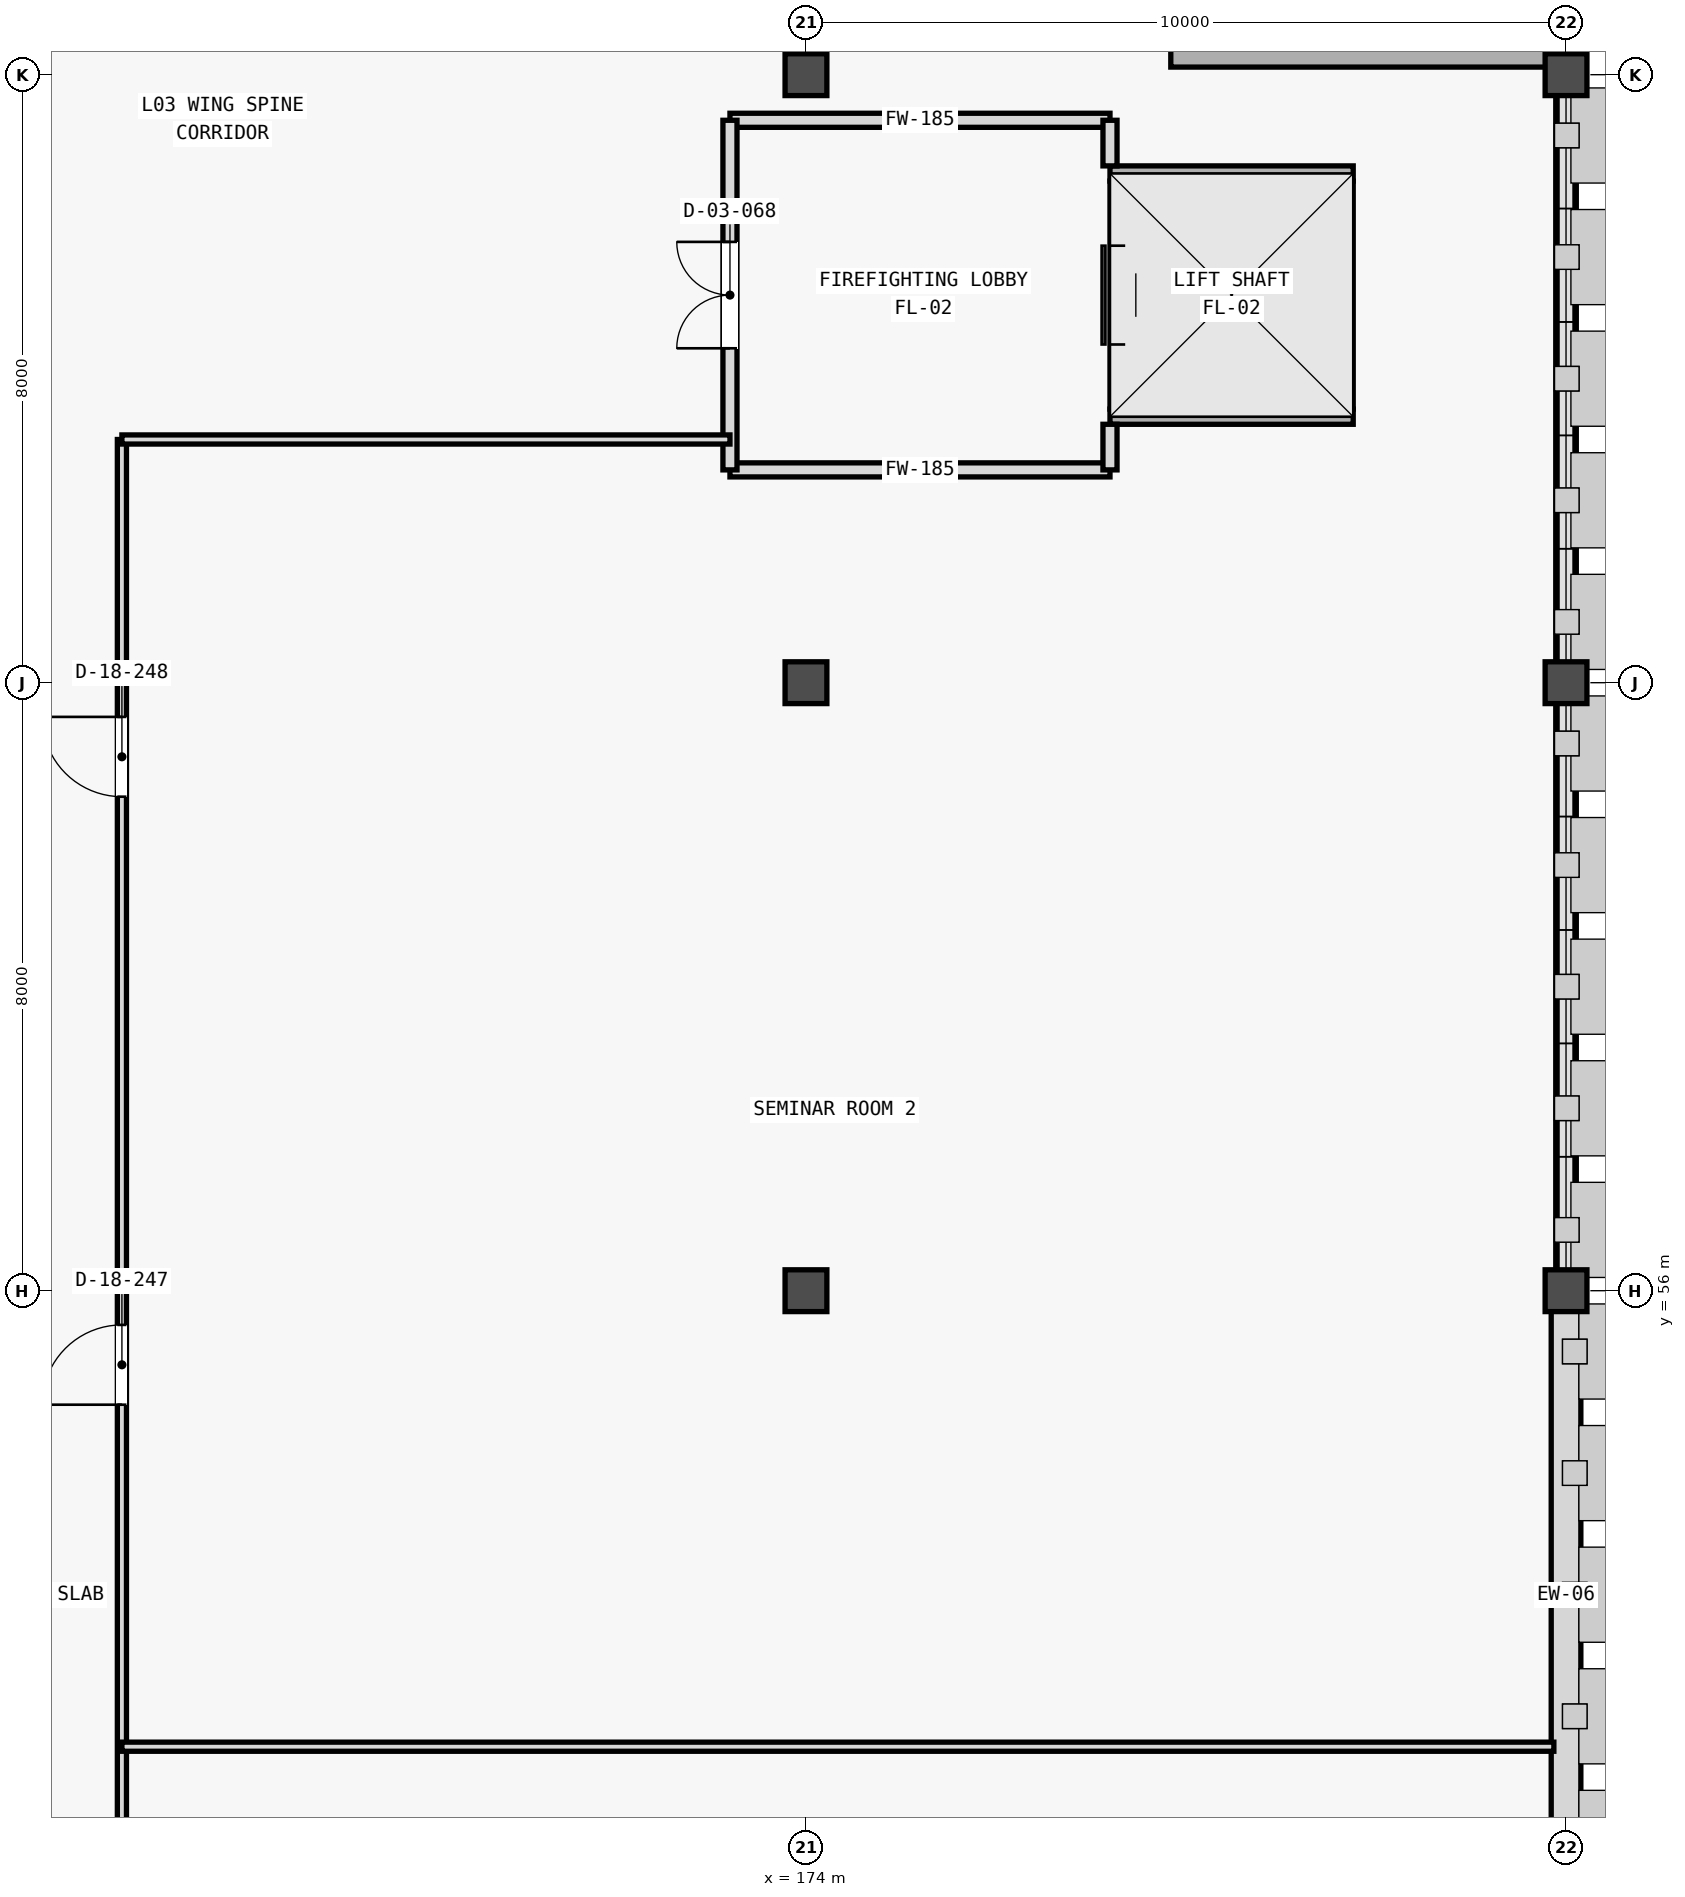
"""IFC4 building model, lengths in metres.
Left out: names, types, materials, properties, quantities, classifications, styles, units other than length and angle.
Written with IfcOpenShell. Run it as: python <this file> out.ifc"""

import sys

from ifc_helpers import new_model, si_unit, direction, frame, frame_2d, origin, origin_2d, place, context, subcontext, project, spatial, rectangle, extrude, element, fill, save


model = new_model("IFC4")
c1 = context("Model", 3, precision=1e-05, world=origin(), true_north=direction((0.0, 1.0)))
c2 = subcontext(c1, "Body", "Model", "MODEL_VIEW")
j1 = project(units=[si_unit("LENGTHUNIT", "METRE"), si_unit("PLANEANGLEUNIT", "RADIAN")], contexts=[c1])
p1 = place(None, origin())
s1 = spatial("IfcSite", under=j1, at=p1, CompositionType="ELEMENT")
p2 = place(p1, origin())
s2 = spatial("IfcBuilding", under=s1, at=p2, CompositionType="ELEMENT")
p3 = place(p2, frame((0.0, 0.0, 14.4)))
s3 = spatial("IfcBuildingStorey", under=s2, at=p3, CompositionType="ELEMENT", Elevation=14.4)
for number, where, z_axis, x_axis in (
    (1, (174.0, 56.0, 0.0), (0.0, 0.0, 1.0), (1.0, 0.0, 0.0)),
    (2, (184.0, 56.0, 0.0), (0.0, 0.0, 1.0), (1.0, 0.0, 0.0)),
    (3, (174.0, 64.0, 0.0), (0.0, 0.0, 1.0), (1.0, 0.0, 0.0)),
    (4, (184.0, 64.0, 0.0), (0.0, 0.0, 1.0), (1.0, 0.0, 0.0)),
    (5, (174.0, 72.0, 0.0), (0.0, 0.0, 1.0), (1.0, 0.0, 0.0)),
    (6, (184.0, 72.0, 0.0), (0.0, 0.0, 1.0), (1.0, 0.0, 0.0)),
):
    element("IfcColumn", number, at=place(p3, frame(where, z_axis=z_axis, x_axis=x_axis)), inside=s3, PredefinedType="COLUMN", context=c2, shape_type="SweptSolid", body=[
        extrude(rectangle(XDim=0.55, YDim=0.55, at=origin_2d()), origin(), (0.0, 0.0, 1.0), 3.975),
    ])
p4 = place(p3, frame((184.0, 48.271, 0.0), z_axis=(0.0, 0.0, 1.0), x_axis=(0.0, 1.0, 0.0)))
e7 = element("IfcWall", 7, at=p4, inside=s3, PredefinedType="STANDARD", context=c2, shape_type="SweptSolid", body=[
    extrude(rectangle(XDim=7.458, YDim=0.39, at=frame_2d((3.729, 0.0))), origin(), (0.0, 0.0, 1.0), 3.3),
])
for number, where, z_axis, x_axis in (
    (8, (184.0, 56.271, 0.0), (0.0, 0.0, 1.0), (0.0, 1.0, 0.0)),
    (9, (184.0, 64.271, 0.0), (0.0, 0.0, 1.0), (0.0, 1.0, 0.0)),
):
    element("IfcWall", number, at=place(p3, frame(where, z_axis=z_axis, x_axis=x_axis)), inside=s3, PredefinedType="STANDARD", context=c2, shape_type="SweptSolid", body=[
        extrude(rectangle(XDim=7.458, YDim=0.27, at=frame_2d((3.729, 0.0))), origin(), (0.0, 0.0, 1.0), 0.8),
    ])
p5 = place(p3, frame((184.0, 72.271, 0.0), z_axis=(0.0, 0.0, 1.0), x_axis=(0.0, 1.0, 0.0)))
e10 = element("IfcWall", 10, at=p5, inside=s3, PredefinedType="SHEAR", context=c2, shape_type="SweptSolid", body=[
    extrude(rectangle(XDim=7.458, YDim=0.3, at=frame_2d((3.729, 0.0))), origin(), (0.0, 0.0, 1.0), 4.2),
])
p6 = place(p3, frame((178.8, 72.225, 0.0), z_axis=(0.0, 0.0, 1.0), x_axis=(1.0, 0.0, 0.0)))
e11 = element("IfcWall", 11, at=p6, inside=s3, PredefinedType="SHEAR", context=c2, shape_type="SweptSolid", body=[
    extrude(rectangle(XDim=5.2, YDim=0.25, at=frame_2d((2.6, 0.0))), origin(), (0.0, 0.0, 1.0), 4.2),
])
for number, where, z_axis, x_axis in (
    (12, (178.0, 67.5, 0.0), (0.0, 0.0, 1.0), (1.0, 0.0, 0.0)),
    (13, (178.0, 70.7, 0.0), (0.0, 0.0, 1.0), (1.0, 0.0, 0.0)),
):
    element("IfcWall", number, at=place(p3, frame(where, z_axis=z_axis, x_axis=x_axis)), inside=s3, PredefinedType="SHEAR", context=c2, shape_type="SweptSolid", body=[
        extrude(rectangle(XDim=3.2, YDim=0.2, at=frame_2d((1.6, 0.0))), origin(), (0.0, 0.0, 1.0), 4.2),
    ])
p7 = place(p3, frame((178.1, 67.6, 0.0), z_axis=(0.0, 0.0, 1.0), x_axis=(0.0, 1.0, 0.0)))
e14 = element("IfcWall", 14, at=p7, inside=s3, PredefinedType="SHEAR", context=c2, shape_type="SweptSolid", body=[
    extrude(rectangle(XDim=3.0, YDim=0.2, at=frame_2d((1.5, 0.0))), origin(), (0.0, 0.0, 1.0), 4.2),
])
p8 = place(p7, frame((0.85, 0.0, 0.0)))
e15 = element("IfcOpeningElement", 15, at=p8, cuts=e14, PredefinedType="OPENING", context=c2, shape_type="SweptSolid", body=[
    extrude(rectangle(XDim=1.3, YDim=2.3, at=frame_2d((0.65, 1.15))), frame((0.0, 0.11, 0.0), z_axis=(0.0, -1.0, 0.0), x_axis=(1.0, 0.0, 0.0)), (0.0, 0.0, 1.0), 0.22),
])
p9 = place(p3, frame((181.1, 67.6, 0.0), z_axis=(0.0, 0.0, 1.0), x_axis=(0.0, 1.0, 0.0)))
e16 = element("IfcWall", 16, at=p9, inside=s3, PredefinedType="SHEAR", context=c2, shape_type="SweptSolid", body=[
    extrude(rectangle(XDim=3.0, YDim=0.2, at=frame_2d((1.5, 0.0))), origin(), (0.0, 0.0, 1.0), 4.2),
])
for number, where, z_axis, x_axis in (
    (17, (178.0, 66.8, 0.0), (0.0, 0.0, 1.0), (-1.0, 0.0, 0.0)),
    (18, (173.0, 71.4, 0.0), (0.0, 0.0, 1.0), (1.0, 0.0, 0.0)),
):
    element("IfcWall", number, at=place(p3, frame(where, z_axis=z_axis, x_axis=x_axis)), inside=s3, PredefinedType="STANDARD", context=c2, shape_type="SweptSolid", body=[
        extrude(rectangle(XDim=5.0, YDim=0.185, at=frame_2d((2.5, 0.0))), origin(), (0.0, 0.0, 1.0), 3.255),
    ])
p10 = place(p3, frame((173.0, 66.8, 0.0), z_axis=(0.0, 0.0, 1.0), x_axis=(0.0, 1.0, 0.0)))
e19 = element("IfcWall", 19, at=p10, inside=s3, PredefinedType="STANDARD", context=c2, shape_type="SweptSolid", body=[
    extrude(rectangle(XDim=4.6, YDim=0.185, at=frame_2d((2.3, 0.0))), origin(), (0.0, 0.0, 1.0), 3.255),
])
p11 = place(p10, frame((1.6, 0.0, 0.0)))
e20 = element("IfcOpeningElement", 20, at=p11, cuts=e19, PredefinedType="OPENING", context=c2, shape_type="SweptSolid", body=[
    extrude(rectangle(XDim=1.4, YDim=2.2, at=frame_2d((0.7, 1.1))), frame((0.0, 0.103, 0.0), z_axis=(0.0, -1.0, 0.0), x_axis=(1.0, 0.0, 0.0)), (0.0, 0.0, 1.0), 0.205),
])
for number, where, z_axis, x_axis in (
    (21, (178.0, 66.8, 0.0), (0.0, 0.0, 1.0), (0.0, 1.0, 0.0)),
    (22, (178.0, 70.8, 0.0), (0.0, 0.0, 1.0), (0.0, 1.0, 0.0)),
):
    element("IfcWall", number, at=place(p3, frame(where, z_axis=z_axis, x_axis=x_axis)), inside=s3, PredefinedType="STANDARD", context=c2, shape_type="SweptSolid", body=[
        extrude(rectangle(XDim=0.6, YDim=0.185, at=frame_2d((0.3, 0.0))), origin(), (0.0, 0.0, 1.0), 3.255),
    ])
p12 = place(p3, frame((165.0, 35.4, 0.0), z_axis=(0.0, 0.0, 1.0), x_axis=(0.0, 1.0, 0.0)))
e23 = element("IfcWall", 23, at=p12, inside=s3, PredefinedType="PARTITIONING", context=c2, shape_type="SweptSolid", body=[
    extrude(rectangle(XDim=31.8, YDim=0.12, at=frame_2d((15.9, 0.0))), origin(), (0.0, 0.0, 1.0), 3.355),
])
p13 = place(p12, frame((3.1, 0.0, 0.0)))
e24 = element("IfcOpeningElement", 24, at=p13, cuts=e23, PredefinedType="OPENING", context=c2, shape_type="SweptSolid", body=[
    extrude(rectangle(XDim=1.05, YDim=2.2, at=frame_2d((0.525, 1.1))), frame((0.0, 0.07, 0.0), z_axis=(0.0, -1.0, 0.0), x_axis=(1.0, 0.0, 0.0)), (0.0, 0.0, 1.0), 0.14),
])
p14 = place(p12, frame((10.1, 0.0, 0.0)))
e25 = element("IfcOpeningElement", 25, at=p14, cuts=e23, PredefinedType="OPENING", context=c2, shape_type="SweptSolid", body=[
    extrude(rectangle(XDim=1.05, YDim=2.2, at=frame_2d((0.525, 1.1))), frame((0.0, 0.07, 0.0), z_axis=(0.0, -1.0, 0.0), x_axis=(1.0, 0.0, 0.0)), (0.0, 0.0, 1.0), 0.14),
])
p15 = place(p12, frame((19.1, 0.0, 0.0)))
e26 = element("IfcOpeningElement", 26, at=p15, cuts=e23, PredefinedType="OPENING", context=c2, shape_type="SweptSolid", body=[
    extrude(rectangle(XDim=1.05, YDim=2.2, at=frame_2d((0.525, 1.1))), frame((0.0, 0.07, 0.0), z_axis=(0.0, -1.0, 0.0), x_axis=(1.0, 0.0, 0.0)), (0.0, 0.0, 1.0), 0.14),
])
p16 = place(p12, frame((27.1, 0.0, 0.0)))
e27 = element("IfcOpeningElement", 27, at=p16, cuts=e23, PredefinedType="OPENING", context=c2, shape_type="SweptSolid", body=[
    extrude(rectangle(XDim=1.05, YDim=2.2, at=frame_2d((0.525, 1.1))), frame((0.0, 0.07, 0.0), z_axis=(0.0, -1.0, 0.0), x_axis=(1.0, 0.0, 0.0)), (0.0, 0.0, 1.0), 0.14),
])
p17 = place(p3, frame((165.0, 67.2, 0.0), z_axis=(0.0, 0.0, 1.0), x_axis=(1.0, 0.0, 0.0)))
e28 = element("IfcWall", 28, at=p17, inside=s3, PredefinedType="PARTITIONING", context=c2, shape_type="SweptSolid", body=[
    extrude(rectangle(XDim=8.0, YDim=0.12, at=frame_2d((4.0, 0.0))), origin(), (0.0, 0.0, 1.0), 3.715),
])
p18 = place(p3, frame((165.0, 50.0, 0.0), z_axis=(0.0, 0.0, 1.0), x_axis=(1.0, 0.0, 0.0)))
e29 = element("IfcWall", 29, at=p18, inside=s3, PredefinedType="PARTITIONING", context=c2, shape_type="SweptSolid", body=[
    extrude(rectangle(XDim=18.84, YDim=0.12, at=frame_2d((9.42, 0.0))), origin(), (0.0, 0.0, 1.0), 3.255),
])
p19 = place(p8, origin())
e30 = element("IfcDoor", 30, at=p19, inside=s3, OperationType="SLIDING_TO_RIGHT", PredefinedType="DOOR", context=c2, shape_type="SweptSolid", body=[
    extrude(rectangle(XDim=1.3, YDim=2.3, at=frame_2d((0.65, 1.15))), frame((0.0, 0.025, 0.0), z_axis=(0.0, -1.0, 0.0), x_axis=(1.0, 0.0, 0.0)), (0.0, 0.0, 1.0), 0.05),
])
fill(e15, e30)
p20 = place(p11, origin())
e31 = element("IfcDoor", 31, at=p20, inside=s3, OperationType="DOUBLE_DOOR_SINGLE_SWING", PredefinedType="DOOR", context=c2, shape_type="SweptSolid", body=[
    extrude(rectangle(XDim=1.4, YDim=2.2, at=frame_2d((0.7, 1.1))), frame((0.0, 0.025, 0.0), z_axis=(0.0, -1.0, 0.0), x_axis=(1.0, 0.0, 0.0)), (0.0, 0.0, 1.0), 0.05),
])
fill(e20, e31)
p21 = place(p15, origin())
e32 = element("IfcDoor", 32, at=p21, inside=s3, OperationType="SINGLE_SWING_LEFT", PredefinedType="DOOR", context=c2, shape_type="SweptSolid", body=[
    extrude(rectangle(XDim=1.05, YDim=2.2, at=frame_2d((0.525, 1.1))), frame((0.0, 0.025, 0.0), z_axis=(0.0, -1.0, 0.0), x_axis=(1.0, 0.0, 0.0)), (0.0, 0.0, 1.0), 0.05),
])
fill(e26, e32)
p22 = place(p16, origin())
e33 = element("IfcDoor", 33, at=p22, inside=s3, OperationType="SINGLE_SWING_RIGHT", PredefinedType="DOOR", context=c2, shape_type="SweptSolid", body=[
    extrude(rectangle(XDim=1.05, YDim=2.2, at=frame_2d((0.525, 1.1))), frame((0.0, 0.025, 0.0), z_axis=(0.0, -1.0, 0.0), x_axis=(1.0, 0.0, 0.0)), (0.0, 0.0, 1.0), 0.05),
])
fill(e27, e33)
save(model, sys.argv[1])
